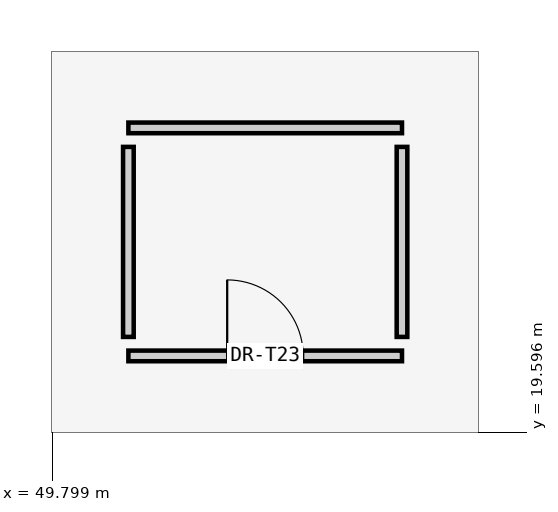
"""IFC4 building model, lengths in metres.
Left out: names, types, materials, properties, quantities, classifications, styles, units other than length and angle.
Written with IfcOpenShell. Run it as: python <this file> out.ifc"""

import sys

from ifc_helpers import new_model, si_unit, direction, frame, frame_2d, origin, place, context, subcontext, project, spatial, rectangle, extrude, element, fill, save


model = new_model("IFC4")
c1 = context("Model", 3, precision=1e-05, world=origin(), true_north=direction((0.0, 1.0)))
c2 = subcontext(c1, "Body", "Model", "MODEL_VIEW")
j1 = project(units=[si_unit("LENGTHUNIT", "METRE"), si_unit("PLANEANGLEUNIT", "RADIAN")], contexts=[c1])
p1 = place(None, origin())
s1 = spatial("IfcSite", under=j1, at=p1, CompositionType="ELEMENT")
p2 = place(p1, origin())
s2 = spatial("IfcBuilding", under=s1, at=p2, CompositionType="ELEMENT")
p3 = place(p2, frame((0.0, 0.0, 10.2)))
s3 = spatial("IfcBuildingStorey", under=s2, at=p3, CompositionType="ELEMENT", Elevation=10.2)
p4 = place(p3, frame((50.8, 20.6, 0.0), z_axis=(0.0, 0.0, 1.0), x_axis=(1.0, 0.0, 0.0)))
e1 = element("IfcWall", 1, at=p4, inside=s3, PredefinedType="PARTITIONING", context=c2, shape_type="SweptSolid", body=[
    extrude(rectangle(XDim=3.6, YDim=0.14, at=frame_2d((1.8, 0.0))), origin(), (0.0, 0.0, 1.0), 4.32),
])
p5 = place(p4, frame((1.3, 0.0, 0.0)))
e2 = element("IfcOpeningElement", 2, at=p5, cuts=e1, PredefinedType="OPENING", context=c2, shape_type="SweptSolid", body=[
    extrude(rectangle(XDim=1.0, YDim=2.15, at=frame_2d((0.5, 1.075))), frame((0.0, 0.08, 0.0), z_axis=(0.0, -1.0, 0.0), x_axis=(1.0, 0.0, 0.0)), (0.0, 0.0, 1.0), 0.16),
])
p6 = place(p3, frame((50.8, 23.6, 0.0), z_axis=(0.0, 0.0, 1.0), x_axis=(1.0, 0.0, 0.0)))
e3 = element("IfcWall", 3, at=p6, inside=s3, PredefinedType="PARTITIONING", context=c2, shape_type="SweptSolid", body=[
    extrude(rectangle(XDim=3.6, YDim=0.14, at=frame_2d((1.8, 0.0))), origin(), (0.0, 0.0, 1.0), 4.32),
])
for number, where, z_axis, x_axis in (
    (4, (50.8, 20.85, 0.0), (0.0, 0.0, 1.0), (0.0, 1.0, 0.0)),
    (5, (54.4, 20.85, 0.0), (0.0, 0.0, 1.0), (0.0, 1.0, 0.0)),
):
    element("IfcWall", number, at=place(p3, frame(where, z_axis=z_axis, x_axis=x_axis)), inside=s3, PredefinedType="PARTITIONING", context=c2, shape_type="SweptSolid", body=[
        extrude(rectangle(XDim=2.5, YDim=0.14, at=frame_2d((1.25, 0.0))), origin(), (0.0, 0.0, 1.0), 4.32),
    ])
p7 = place(p5, origin())
e6 = element("IfcDoor", 6, at=p7, inside=s3, OperationType="SINGLE_SWING_LEFT", PredefinedType="DOOR", context=c2, shape_type="SweptSolid", body=[
    extrude(rectangle(XDim=1.0, YDim=2.15, at=frame_2d((0.5, 1.075))), frame((0.0, 0.025, 0.0), z_axis=(0.0, -1.0, 0.0), x_axis=(1.0, 0.0, 0.0)), (0.0, 0.0, 1.0), 0.05),
])
fill(e2, e6)
save(model, sys.argv[1])
